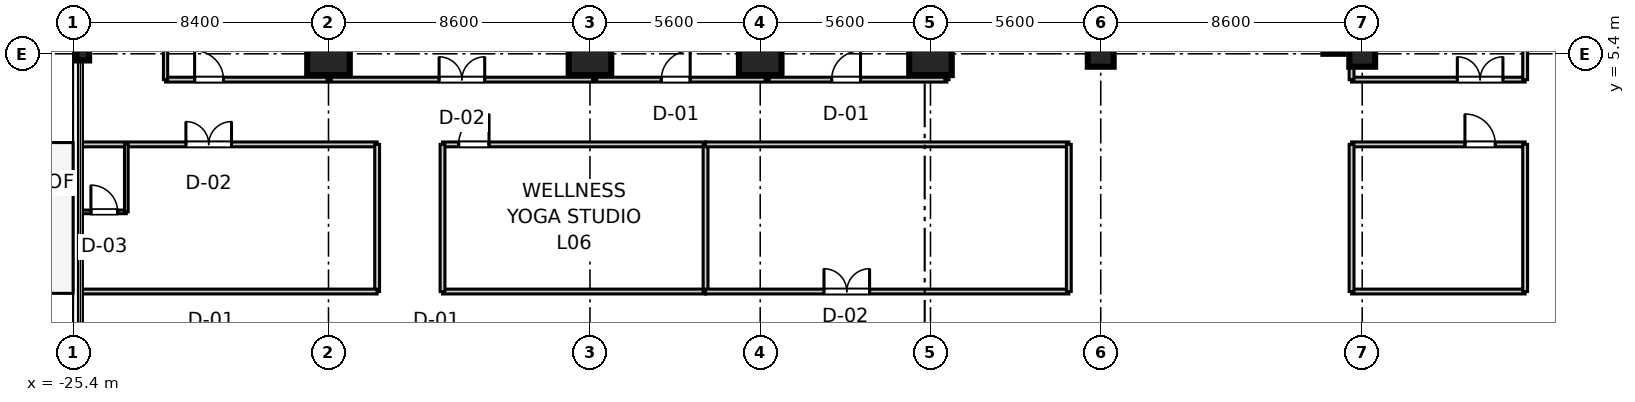
"""IFC4 building model, lengths in metres.
Left out: names, types, materials, properties, quantities, classifications, styles, units other than length and angle.
Written with IfcOpenShell. Run it as: python <this file> out.ifc"""

import sys

from ifc_helpers import new_model, si_unit, direction, frame, frame_2d, origin, origin_2d, place, context, subcontext, project, spatial, rectangle, i_section, extrude, source, transform, mapped, element, fill, save


model = new_model("IFC4")
c1 = context("Model", 3, precision=1e-05, world=origin(), true_north=direction((0.0, 1.0)))
c2 = subcontext(c1, "Body", "Model", "MODEL_VIEW")
j1 = project(units=[si_unit("LENGTHUNIT", "METRE"), si_unit("PLANEANGLEUNIT", "RADIAN")], contexts=[c1])
p1 = place(None, origin())
s1 = spatial("IfcSite", under=j1, at=p1, CompositionType="ELEMENT")
p2 = place(p1, origin())
s2 = spatial("IfcBuilding", under=s1, at=p2, CompositionType="ELEMENT")
p3 = place(p2, frame((0.0, 0.0, 32.4)))
s3 = spatial("IfcBuildingStorey", under=s2, at=p3, CompositionType="ELEMENT", Elevation=32.4)
m1 = source(origin(), c2, "Body", "SweptSolid", [
    extrude(rectangle(XDim=1.4, YDim=1.4, at=origin_2d()), origin(), (0.0, 0.0, 1.0), 3.605),
])
for number, where, z_axis, x_axis in (
    (1, (-17.0, 5.4, 0.0), (0.0, 0.0, 1.0), (1.0, 0.0, 0.0)),
    (2, (-8.4, 5.4, 0.0), (0.0, 0.0, 1.0), (1.0, 0.0, 0.0)),
    (3, (-2.8, 5.4, 0.0), (0.0, 0.0, 1.0), (1.0, 0.0, 0.0)),
    (4, (2.8, 5.4, 0.0), (0.0, 0.0, 1.0), (1.0, 0.0, 0.0)),
):
    element("IfcColumn", number, at=place(p3, frame(where, z_axis=z_axis, x_axis=x_axis)), inside=s3, PredefinedType="COLUMN", context=c2, shape_type="MappedRepresentation", body=[
        mapped(m1, transform((0.0, 0.0, 0.0), scale=1.0)),
    ])
m2 = source(origin(), c2, "Body", "SweptSolid", [
    extrude(rectangle(XDim=0.85, YDim=0.85, at=origin_2d()), origin(), (0.0, 0.0, 1.0), 3.605),
])
for number, where, z_axis, x_axis in (
    (5, (8.4, 5.4, 0.0), (0.0, 0.0, 1.0), (1.0, 0.0, 0.0)),
    (6, (17.0, 5.4, 0.0), (0.0, 0.0, 1.0), (1.0, 0.0, 0.0)),
):
    element("IfcColumn", number, at=place(p3, frame(where, z_axis=z_axis, x_axis=x_axis)), inside=s3, PredefinedType="PILASTER", context=c2, shape_type="MappedRepresentation", body=[
        mapped(m2, transform((0.0, 0.0, 0.0), scale=1.0)),
    ])
m3 = source(origin(), c2, "Body", "SweptSolid", [
    extrude(i_section(OverallWidth=0.412, OverallDepth=0.438, WebThickness=0.023, FlangeThickness=0.036, at=origin_2d()), origin(), (0.0, 0.0, 1.0), 3.605),
])
p4 = place(p3, frame((-25.08, 5.4, 0.0), z_axis=(0.0, 0.0, 1.0), x_axis=(1.0, 0.0, 0.0)))
e7 = element("IfcColumn", 7, at=p4, inside=s3, PredefinedType="COLUMN", context=c2, shape_type="MappedRepresentation", body=[
    mapped(m3, transform((0.0, 0.0, 0.0), scale=1.0)),
])
m4 = source(origin(), c2, "Body", "SweptSolid", [
    extrude(rectangle(XDim=11.6, YDim=0.65, at=frame_2d((5.8, 0.0))), origin(), (0.0, 0.0, 1.0), 3.37),
])
p5 = place(p3, frame((16.05, 5.4, 0.0), z_axis=(0.0, 0.0, 1.0), x_axis=(0.0, 1.0, 0.0)))
e8 = element("IfcWall", 8, at=p5, inside=s3, PredefinedType="SHEAR", context=c2, shape_type="MappedRepresentation", body=[
    mapped(m4, transform((0.0, 0.0, 0.0), scale=1.0)),
])
m5 = source(origin(), c2, "Body", "SweptSolid", [
    extrude(rectangle(XDim=5.71, YDim=0.16, at=frame_2d((2.855, 0.0))), origin(), (0.0, 0.0, 1.0), 2.71),
])
p6 = place(p3, frame((16.65, 4.55, 0.0), z_axis=(0.0, 0.0, 1.0), x_axis=(1.0, 0.0, 0.0)))
e9 = element("IfcWall", 9, at=p6, inside=s3, PredefinedType="PARTITIONING", context=c2, shape_type="MappedRepresentation", body=[
    mapped(m5, transform((0.0, 0.0, 0.0), scale=1.0)),
])
p7 = place(p6, frame((3.479, 0.0, 0.0)))
e10 = element("IfcOpeningElement", 10, at=p7, cuts=e9, PredefinedType="OPENING", context=c2, shape_type="SweptSolid", body=[
    extrude(rectangle(XDim=1.5, YDim=2.15, at=frame_2d((0.75, 1.075))), frame((0.0, 0.09, 0.0), z_axis=(0.0, -1.0, 0.0), x_axis=(1.0, 0.0, 0.0)), (0.0, 0.0, 1.0), 0.18),
])
m6 = source(origin(), c2, "Body", "SweptSolid", [
    extrude(rectangle(XDim=20.55, YDim=0.16, at=frame_2d((10.275, 0.0))), origin(), (0.0, 0.0, 1.0), 2.71),
])
p8 = place(p3, frame((16.65, 4.55, 0.0), z_axis=(0.0, 0.0, 1.0), x_axis=(0.0, 1.0, 0.0)))
e11 = element("IfcWall", 11, at=p8, inside=s3, PredefinedType="PARTITIONING", context=c2, shape_type="MappedRepresentation", body=[
    mapped(m6, transform((0.0, 0.0, 0.0), scale=1.0)),
])
m7 = source(origin(), c2, "Body", "SweptSolid", [
    extrude(rectangle(XDim=19.13, YDim=0.16, at=frame_2d((9.565, 0.0))), origin(), (0.0, 0.0, 1.0), 2.71),
])
p9 = place(p3, frame((22.36, 4.55, 0.0), z_axis=(0.0, 0.0, 1.0), x_axis=(0.0, 1.0, 0.0)))
e12 = element("IfcWall", 12, at=p9, inside=s3, PredefinedType="PARTITIONING", context=c2, shape_type="MappedRepresentation", body=[
    mapped(m7, transform((0.0, 0.0, 0.0), scale=1.0)),
])
m8 = source(origin(), c2, "Body", "SweptSolid", [
    extrude(rectangle(XDim=25.7, YDim=0.16, at=frame_2d((12.85, 0.0))), origin(), (0.0, 0.0, 1.0), 2.71),
])
p10 = place(p3, frame((-22.36, 4.55, 0.0), z_axis=(0.0, 0.0, 1.0), x_axis=(1.0, 0.0, 0.0)))
e13 = element("IfcWall", 13, at=p10, inside=s3, PredefinedType="PARTITIONING", context=c2, shape_type="MappedRepresentation", body=[
    mapped(m8, transform((0.0, 0.0, 0.0), scale=1.0)),
])
p11 = place(p10, frame((0.956, 0.0, 0.0)))
e14 = element("IfcOpeningElement", 14, at=p11, cuts=e13, PredefinedType="OPENING", context=c2, shape_type="SweptSolid", body=[
    extrude(rectangle(XDim=0.95, YDim=2.1, at=frame_2d((0.475, 1.05))), frame((0.0, 0.09, 0.0), z_axis=(0.0, -1.0, 0.0), x_axis=(1.0, 0.0, 0.0)), (0.0, 0.0, 1.0), 0.18),
])
p12 = place(p10, frame((8.998, 0.0, 0.0)))
e15 = element("IfcOpeningElement", 15, at=p12, cuts=e13, PredefinedType="OPENING", context=c2, shape_type="SweptSolid", body=[
    extrude(rectangle(XDim=1.5, YDim=2.15, at=frame_2d((0.75, 1.075))), frame((0.0, 0.09, 0.0), z_axis=(0.0, -1.0, 0.0), x_axis=(1.0, 0.0, 0.0)), (0.0, 0.0, 1.0), 0.18),
])
p13 = place(p10, frame((16.306, 0.0, 0.0)))
e16 = element("IfcOpeningElement", 16, at=p13, cuts=e13, PredefinedType="OPENING", context=c2, shape_type="SweptSolid", body=[
    extrude(rectangle(XDim=0.95, YDim=2.1, at=frame_2d((0.475, 1.05))), frame((0.0, 0.09, 0.0), z_axis=(0.0, -1.0, 0.0), x_axis=(1.0, 0.0, 0.0)), (0.0, 0.0, 1.0), 0.18),
])
p14 = place(p10, frame((21.909, 0.0, 0.0)))
e17 = element("IfcOpeningElement", 17, at=p14, cuts=e13, PredefinedType="OPENING", context=c2, shape_type="SweptSolid", body=[
    extrude(rectangle(XDim=0.95, YDim=2.1, at=frame_2d((0.475, 1.05))), frame((0.0, 0.09, 0.0), z_axis=(0.0, -1.0, 0.0), x_axis=(1.0, 0.0, 0.0)), (0.0, 0.0, 1.0), 0.18),
])
m9 = source(origin(), c2, "Body", "SweptSolid", [
    extrude(rectangle(XDim=19.13, YDim=0.14, at=frame_2d((9.565, 0.0))), origin(), (0.0, 0.0, 1.0), 2.71),
])
p15 = place(p3, frame((-22.36, 4.55, 0.0), z_axis=(0.0, 0.0, 1.0), x_axis=(0.0, 1.0, 0.0)))
e18 = element("IfcWall", 18, at=p15, inside=s3, PredefinedType="PARTITIONING", context=c2, shape_type="MappedRepresentation", body=[
    mapped(m9, transform((0.0, 0.0, 0.0), scale=1.0)),
])
m10 = source(origin(), c2, "Body", "SweptSolid", [
    extrude(rectangle(XDim=20.55, YDim=0.14, at=frame_2d((10.275, 0.0))), origin(), (0.0, 0.0, 1.0), 2.71),
])
for number, where, z_axis, x_axis in (
    (19, (3.34, 4.55, 0.0), (0.0, 0.0, 1.0), (0.0, 1.0, 0.0)),
    (20, (-16.978, 4.55, 0.0), (0.0, 0.0, 1.0), (0.0, 1.0, 0.0)),
    (21, (-8.246, 4.55, 0.0), (0.0, 0.0, 1.0), (0.0, 1.0, 0.0)),
    (22, (-2.571, 4.55, 0.0), (0.0, 0.0, 1.0), (0.0, 1.0, 0.0)),
):
    element("IfcWall", number, at=place(p3, frame(where, z_axis=z_axis, x_axis=x_axis)), inside=s3, PredefinedType="PARTITIONING", context=c2, shape_type="MappedRepresentation", body=[
        mapped(m10, transform((0.0, 0.0, 0.0), scale=1.0)),
    ])
m11 = source(origin(), c2, "Body", "SweptSolid", [
    extrude(rectangle(XDim=9.7, YDim=0.16, at=frame_2d((4.85, 0.0))), origin(), (0.0, 0.0, 1.0), 2.71),
])
p16 = place(p3, frame((-25.1, 2.42, 0.0), z_axis=(0.0, 0.0, 1.0), x_axis=(1.0, 0.0, 0.0)))
e23 = element("IfcWall", 23, at=p16, inside=s3, PredefinedType="PARTITIONING", context=c2, shape_type="MappedRepresentation", body=[
    mapped(m11, transform((0.0, 0.0, 0.0), scale=1.0)),
])
p17 = place(p16, frame((3.41, 0.0, 0.0)))
e24 = element("IfcOpeningElement", 24, at=p17, cuts=e23, PredefinedType="OPENING", context=c2, shape_type="SweptSolid", body=[
    extrude(rectangle(XDim=1.5, YDim=2.15, at=frame_2d((0.75, 1.075))), frame((0.0, 0.09, 0.0), z_axis=(0.0, -1.0, 0.0), x_axis=(1.0, 0.0, 0.0)), (0.0, 0.0, 1.0), 0.18),
])
m12 = source(origin(), c2, "Body", "SweptSolid", [
    extrude(rectangle(XDim=4.84, YDim=0.16, at=frame_2d((2.42, 0.0))), origin(), (0.0, 0.0, 1.0), 2.71),
])
p18 = place(p3, frame((-15.4, -2.42, 0.0), z_axis=(0.0, 0.0, 1.0), x_axis=(0.0, 1.0, 0.0)))
e25 = element("IfcWall", 25, at=p18, inside=s3, PredefinedType="PARTITIONING", context=c2, shape_type="MappedRepresentation", body=[
    mapped(m12, transform((0.0, 0.0, 0.0), scale=1.0)),
])
p19 = place(p3, frame((-25.1, -2.42, 0.0), z_axis=(0.0, 0.0, 1.0), x_axis=(1.0, 0.0, 0.0)))
e26 = element("IfcWall", 26, at=p19, inside=s3, PredefinedType="PARTITIONING", context=c2, shape_type="MappedRepresentation", body=[
    mapped(m11, transform((0.0, 0.0, 0.0), scale=1.0)),
])
m13 = source(origin(), c2, "Body", "SweptSolid", [
    extrude(rectangle(XDim=1.45, YDim=0.12, at=frame_2d((0.725, 0.0))), origin(), (0.0, 0.0, 1.0), 2.71),
])
p20 = place(p3, frame((-25.1, 0.2, 0.0), z_axis=(0.0, 0.0, 1.0), x_axis=(1.0, 0.0, 0.0)))
e27 = element("IfcWall", 27, at=p20, inside=s3, PredefinedType="PARTITIONING", context=c2, shape_type="MappedRepresentation", body=[
    mapped(m13, transform((0.0, 0.0, 0.0), scale=1.0)),
])
p21 = place(p20, frame((0.285, 0.0, 0.0)))
e28 = element("IfcOpeningElement", 28, at=p21, cuts=e27, PredefinedType="OPENING", context=c2, shape_type="SweptSolid", body=[
    extrude(rectangle(XDim=0.88, YDim=2.1, at=frame_2d((0.44, 1.05))), frame((0.0, 0.07, 0.0), z_axis=(0.0, -1.0, 0.0), x_axis=(1.0, 0.0, 0.0)), (0.0, 0.0, 1.0), 0.14),
])
m14 = source(origin(), c2, "Body", "SweptSolid", [
    extrude(rectangle(XDim=2.22, YDim=0.12, at=frame_2d((1.11, 0.0))), origin(), (0.0, 0.0, 1.0), 2.71),
])
p22 = place(p3, frame((-23.65, 0.2, 0.0), z_axis=(0.0, 0.0, 1.0), x_axis=(0.0, 1.0, 0.0)))
e29 = element("IfcWall", 29, at=p22, inside=s3, PredefinedType="PARTITIONING", context=c2, shape_type="MappedRepresentation", body=[
    mapped(m14, transform((0.0, 0.0, 0.0), scale=1.0)),
])
m15 = source(origin(), c2, "Body", "SweptSolid", [
    extrude(rectangle(XDim=8.652, YDim=0.16, at=frame_2d((4.326, 0.0))), origin(), (0.0, 0.0, 1.0), 2.71),
])
p23 = place(p3, frame((-13.25, -2.42, 0.0), z_axis=(0.0, 0.0, 1.0), x_axis=(1.0, 0.0, 0.0)))
e30 = element("IfcWall", 30, at=p23, inside=s3, PredefinedType="PARTITIONING", context=c2, shape_type="MappedRepresentation", body=[
    mapped(m15, transform((0.0, 0.0, 0.0), scale=1.0)),
])
p24 = place(p3, frame((-13.25, 2.42, 0.0), z_axis=(0.0, 0.0, 1.0), x_axis=(1.0, 0.0, 0.0)))
e31 = element("IfcWall", 31, at=p24, inside=s3, PredefinedType="PARTITIONING", context=c2, shape_type="MappedRepresentation", body=[
    mapped(m15, transform((0.0, 0.0, 0.0), scale=1.0)),
])
p25 = place(p24, frame((0.53, 0.0, 0.0)))
e32 = element("IfcOpeningElement", 32, at=p25, cuts=e31, PredefinedType="OPENING", context=c2, shape_type="SweptSolid", body=[
    extrude(rectangle(XDim=1.0, YDim=2.1, at=frame_2d((0.5, 1.05))), frame((0.0, 0.09, 0.0), z_axis=(0.0, -1.0, 0.0), x_axis=(1.0, 0.0, 0.0)), (0.0, 0.0, 1.0), 0.18),
])
for number, where, z_axis, x_axis in (
    (33, (-13.25, -2.42, 0.0), (0.0, 0.0, 1.0), (0.0, 1.0, 0.0)),
    (34, (-4.598, -2.42, 0.0), (0.0, 0.0, 1.0), (0.0, 1.0, 0.0)),
):
    element("IfcWall", number, at=place(p3, frame(where, z_axis=z_axis, x_axis=x_axis)), inside=s3, PredefinedType="PARTITIONING", context=c2, shape_type="MappedRepresentation", body=[
        mapped(m12, transform((0.0, 0.0, 0.0), scale=1.0)),
    ])
m16 = source(origin(), c2, "Body", "SweptSolid", [
    extrude(rectangle(XDim=11.948, YDim=0.16, at=frame_2d((5.974, 0.0))), origin(), (0.0, 0.0, 1.0), 2.71),
])
p26 = place(p3, frame((-4.598, -2.42, 0.0), z_axis=(0.0, 0.0, 1.0), x_axis=(1.0, 0.0, 0.0)))
e35 = element("IfcWall", 35, at=p26, inside=s3, PredefinedType="PARTITIONING", context=c2, shape_type="MappedRepresentation", body=[
    mapped(m16, transform((0.0, 0.0, 0.0), scale=1.0)),
])
p27 = place(p26, frame((3.895, 0.0, 0.0)))
e36 = element("IfcOpeningElement", 36, at=p27, cuts=e35, PredefinedType="OPENING", context=c2, shape_type="SweptSolid", body=[
    extrude(rectangle(XDim=1.5, YDim=2.15, at=frame_2d((0.75, 1.075))), frame((0.0, 0.09, 0.0), z_axis=(0.0, -1.0, 0.0), x_axis=(1.0, 0.0, 0.0)), (0.0, 0.0, 1.0), 0.18),
])
p28 = place(p3, frame((-4.598, 2.42, 0.0), z_axis=(0.0, 0.0, 1.0), x_axis=(1.0, 0.0, 0.0)))
e37 = element("IfcWall", 37, at=p28, inside=s3, PredefinedType="PARTITIONING", context=c2, shape_type="MappedRepresentation", body=[
    mapped(m16, transform((0.0, 0.0, 0.0), scale=1.0)),
])
p29 = place(p3, frame((7.35, -2.42, 0.0), z_axis=(0.0, 0.0, 1.0), x_axis=(0.0, 1.0, 0.0)))
e38 = element("IfcWall", 38, at=p29, inside=s3, PredefinedType="PARTITIONING", context=c2, shape_type="MappedRepresentation", body=[
    mapped(m12, transform((0.0, 0.0, 0.0), scale=1.0)),
])
p30 = place(p3, frame((16.65, -2.42, 0.0), z_axis=(0.0, 0.0, 1.0), x_axis=(1.0, 0.0, 0.0)))
e39 = element("IfcWall", 39, at=p30, inside=s3, PredefinedType="PARTITIONING", context=c2, shape_type="MappedRepresentation", body=[
    mapped(m5, transform((0.0, 0.0, 0.0), scale=1.0)),
])
p31 = place(p3, frame((16.65, 2.42, 0.0), z_axis=(0.0, 0.0, 1.0), x_axis=(1.0, 0.0, 0.0)))
e40 = element("IfcWall", 40, at=p31, inside=s3, PredefinedType="PARTITIONING", context=c2, shape_type="MappedRepresentation", body=[
    mapped(m5, transform((0.0, 0.0, 0.0), scale=1.0)),
])
p32 = place(p31, frame((3.729, 0.0, 0.0)))
e41 = element("IfcOpeningElement", 41, at=p32, cuts=e40, PredefinedType="OPENING", context=c2, shape_type="SweptSolid", body=[
    extrude(rectangle(XDim=1.0, YDim=2.1, at=frame_2d((0.5, 1.05))), frame((0.0, 0.09, 0.0), z_axis=(0.0, -1.0, 0.0), x_axis=(1.0, 0.0, 0.0)), (0.0, 0.0, 1.0), 0.18),
])
for number, where, z_axis, x_axis in (
    (42, (16.65, -2.42, 0.0), (0.0, 0.0, 1.0), (0.0, 1.0, 0.0)),
    (43, (22.36, -2.42, 0.0), (0.0, 0.0, 1.0), (0.0, 1.0, 0.0)),
):
    element("IfcWall", number, at=place(p3, frame(where, z_axis=z_axis, x_axis=x_axis)), inside=s3, PredefinedType="PARTITIONING", context=c2, shape_type="MappedRepresentation", body=[
        mapped(m12, transform((0.0, 0.0, 0.0), scale=1.0)),
    ])
m17 = source(origin(), c2, "Body", "SweptSolid", [
    extrude(rectangle(XDim=1.5, YDim=2.15, at=frame_2d((0.75, 1.075))), frame((0.0, 0.025, 0.0), z_axis=(0.0, -1.0, 0.0), x_axis=(1.0, 0.0, 0.0)), (0.0, 0.0, 1.0), 0.05),
])
p33 = place(p7, origin())
e44 = element("IfcDoor", 44, at=p33, inside=s3, OperationType="DOUBLE_DOOR_SINGLE_SWING", PredefinedType="DOOR", context=c2, shape_type="MappedRepresentation", body=[
    mapped(m17, transform((0.0, 0.0, 0.0), scale=1.0)),
])
fill(e10, e44)
m18 = source(origin(), c2, "Body", "SweptSolid", [
    extrude(rectangle(XDim=0.95, YDim=2.1, at=frame_2d((0.475, 1.05))), frame((0.0, 0.025, 0.0), z_axis=(0.0, -1.0, 0.0), x_axis=(1.0, 0.0, 0.0)), (0.0, 0.0, 1.0), 0.05),
])
p34 = place(p11, origin())
e45 = element("IfcDoor", 45, at=p34, inside=s3, OperationType="SINGLE_SWING_LEFT", PredefinedType="DOOR", context=c2, shape_type="MappedRepresentation", body=[
    mapped(m18, transform((0.0, 0.0, 0.0), scale=1.0)),
])
fill(e14, e45)
p35 = place(p12, origin())
e46 = element("IfcDoor", 46, at=p35, inside=s3, OperationType="DOUBLE_DOOR_SINGLE_SWING", PredefinedType="DOOR", context=c2, shape_type="MappedRepresentation", body=[
    mapped(m17, transform((0.0, 0.0, 0.0), scale=1.0)),
])
fill(e15, e46)
p36 = place(p13, origin())
e47 = element("IfcDoor", 47, at=p36, inside=s3, OperationType="SINGLE_SWING_RIGHT", PredefinedType="DOOR", context=c2, shape_type="MappedRepresentation", body=[
    mapped(m18, transform((0.0, 0.0, 0.0), scale=1.0)),
])
fill(e16, e47)
p37 = place(p14, origin())
e48 = element("IfcDoor", 48, at=p37, inside=s3, OperationType="SINGLE_SWING_RIGHT", PredefinedType="DOOR", context=c2, shape_type="MappedRepresentation", body=[
    mapped(m18, transform((0.0, 0.0, 0.0), scale=1.0)),
])
fill(e17, e48)
m19 = source(origin(), c2, "Body", "SweptSolid", [
    extrude(rectangle(XDim=0.88, YDim=2.1, at=frame_2d((0.44, 1.05))), frame((0.0, 0.025, 0.0), z_axis=(0.0, -1.0, 0.0), x_axis=(1.0, 0.0, 0.0)), (0.0, 0.0, 1.0), 0.05),
])
p38 = place(p21, origin())
e49 = element("IfcDoor", 49, at=p38, inside=s3, OperationType="SINGLE_SWING_LEFT", PredefinedType="DOOR", context=c2, shape_type="MappedRepresentation", body=[
    mapped(m19, transform((0.0, 0.0, 0.0), scale=1.0)),
])
fill(e28, e49)
p39 = place(p17, origin())
e50 = element("IfcDoor", 50, at=p39, inside=s3, OperationType="DOUBLE_DOOR_SINGLE_SWING", PredefinedType="DOOR", context=c2, shape_type="MappedRepresentation", body=[
    mapped(m17, transform((0.0, 0.0, 0.0), scale=1.0)),
])
fill(e24, e50)
m20 = source(origin(), c2, "Body", "SweptSolid", [
    extrude(rectangle(XDim=1.0, YDim=2.1, at=frame_2d((0.5, 1.05))), frame((0.0, 0.025, 0.0), z_axis=(0.0, -1.0, 0.0), x_axis=(1.0, 0.0, 0.0)), (0.0, 0.0, 1.0), 0.05),
])
p40 = place(p25, frame((1.0, 0.0, 0.0), z_axis=(0.0, 0.0, 1.0), x_axis=(-1.0, 0.0, 0.0)))
e51 = element("IfcDoor", 51, at=p40, inside=s3, OperationType="SINGLE_SWING_RIGHT", PredefinedType="DOOR", context=c2, shape_type="MappedRepresentation", body=[
    mapped(m20, transform((0.0, 0.0, 0.0), scale=1.0)),
])
fill(e32, e51)
p41 = place(p27, origin())
e52 = element("IfcDoor", 52, at=p41, inside=s3, OperationType="DOUBLE_DOOR_SINGLE_SWING", PredefinedType="DOOR", context=c2, shape_type="MappedRepresentation", body=[
    mapped(m17, transform((0.0, 0.0, 0.0), scale=1.0)),
])
fill(e36, e52)
p42 = place(p32, frame((1.0, 0.0, 0.0), z_axis=(0.0, 0.0, 1.0), x_axis=(-1.0, 0.0, 0.0)))
e53 = element("IfcDoor", 53, at=p42, inside=s3, OperationType="SINGLE_SWING_LEFT", PredefinedType="DOOR", context=c2, shape_type="MappedRepresentation", body=[
    mapped(m20, transform((0.0, 0.0, 0.0), scale=1.0)),
])
fill(e41, e53)
save(model, sys.argv[1])
